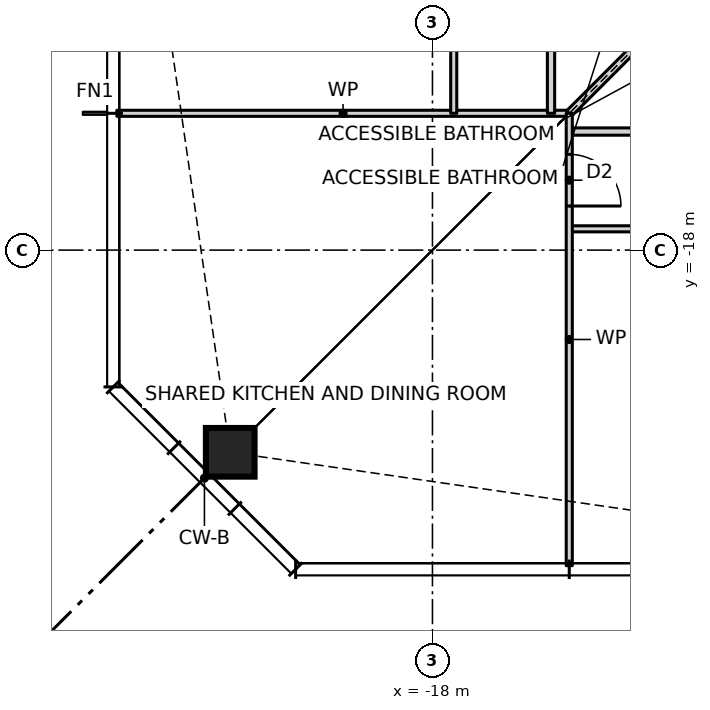
"""IFC4 building model, lengths in metres.
Left out: names, types, materials, properties, quantities, classifications, styles, units other than length and angle.
Written with IfcOpenShell. Run it as: python <this file> out.ifc"""

import sys

from ifc_helpers import new_model, si_unit, direction, frame, frame_2d, origin, origin_2d, place, context, subcontext, project, spatial, rectangle, hollow_rectangle, extrude, element, fill, save


model = new_model("IFC4")
c1 = context("Model", 3, precision=1e-05, world=origin(), true_north=direction((0.0, 1.0)))
c2 = subcontext(c1, "Body", "Model", "MODEL_VIEW")
j1 = project(units=[si_unit("LENGTHUNIT", "METRE"), si_unit("PLANEANGLEUNIT", "RADIAN")], contexts=[c1])
p1 = place(None, origin())
s1 = spatial("IfcSite", under=j1, at=p1, CompositionType="ELEMENT")
p2 = place(p1, origin())
s2 = spatial("IfcBuilding", under=s1, at=p2, CompositionType="ELEMENT")
p3 = place(p2, frame((0.0, 0.0, 18.5)))
s3 = spatial("IfcBuildingStorey", under=s2, at=p3, CompositionType="ELEMENT", Elevation=18.5)
p4 = place(p3, frame((-21.326, -21.326, 0.0), z_axis=(0.0, 0.0, 1.0), x_axis=(1.0, 0.0, 0.0)))
e1 = element("IfcColumn", 1, at=p4, inside=s3, PredefinedType="COLUMN", context=c2, shape_type="SweptSolid", body=[
    extrude(hollow_rectangle(XDim=0.8, YDim=0.8, WallThickness=0.09, at=origin_2d()), origin(), (0.0, 0.0, 1.0), 3.5),
])
p5 = place(p3, frame((-15.75, -17.65, 0.0), z_axis=(0.0, 0.0, 1.0), x_axis=(1.0, 0.0, 0.0)))
e2 = element("IfcWall", 2, at=p5, inside=s3, PredefinedType="PARTITIONING", context=c2, shape_type="SweptSolid", body=[
    extrude(rectangle(XDim=31.5, YDim=0.1, at=frame_2d((15.75, 0.0))), origin(), (0.0, 0.0, 1.0), 3.27),
])
p6 = place(p5, frame((1.8, 0.0, 0.0)))
e3 = element("IfcOpeningElement", 3, at=p6, cuts=e2, PredefinedType="OPENING", context=c2, shape_type="SweptSolid", body=[
    extrude(rectangle(XDim=0.9, YDim=2.1, at=frame_2d((0.45, 1.05))), frame((0.0, 0.06, 0.0), z_axis=(0.0, -1.0, 0.0), x_axis=(1.0, 0.0, 0.0)), (0.0, 0.0, 1.0), 0.12),
])
p7 = place(p5, frame((6.3, 0.0, 0.0)))
e4 = element("IfcOpeningElement", 4, at=p7, cuts=e2, PredefinedType="OPENING", context=c2, shape_type="SweptSolid", body=[
    extrude(rectangle(XDim=0.9, YDim=2.1, at=frame_2d((0.45, 1.05))), frame((0.0, 0.06, 0.0), z_axis=(0.0, -1.0, 0.0), x_axis=(1.0, 0.0, 0.0)), (0.0, 0.0, 1.0), 0.12),
])
p8 = place(p5, frame((10.8, 0.0, 0.0)))
e5 = element("IfcOpeningElement", 5, at=p8, cuts=e2, PredefinedType="OPENING", context=c2, shape_type="SweptSolid", body=[
    extrude(rectangle(XDim=0.9, YDim=2.1, at=frame_2d((0.45, 1.05))), frame((0.0, 0.06, 0.0), z_axis=(0.0, -1.0, 0.0), x_axis=(1.0, 0.0, 0.0)), (0.0, 0.0, 1.0), 0.12),
])
p9 = place(p5, frame((15.3, 0.0, 0.0)))
e6 = element("IfcOpeningElement", 6, at=p9, cuts=e2, PredefinedType="OPENING", context=c2, shape_type="SweptSolid", body=[
    extrude(rectangle(XDim=0.9, YDim=2.1, at=frame_2d((0.45, 1.05))), frame((0.0, 0.06, 0.0), z_axis=(0.0, -1.0, 0.0), x_axis=(1.0, 0.0, 0.0)), (0.0, 0.0, 1.0), 0.12),
])
p10 = place(p5, frame((19.8, 0.0, 0.0)))
e7 = element("IfcOpeningElement", 7, at=p10, cuts=e2, PredefinedType="OPENING", context=c2, shape_type="SweptSolid", body=[
    extrude(rectangle(XDim=0.9, YDim=2.1, at=frame_2d((0.45, 1.05))), frame((0.0, 0.06, 0.0), z_axis=(0.0, -1.0, 0.0), x_axis=(1.0, 0.0, 0.0)), (0.0, 0.0, 1.0), 0.12),
])
p11 = place(p5, frame((24.3, 0.0, 0.0)))
e8 = element("IfcOpeningElement", 8, at=p11, cuts=e2, PredefinedType="OPENING", context=c2, shape_type="SweptSolid", body=[
    extrude(rectangle(XDim=0.9, YDim=2.1, at=frame_2d((0.45, 1.05))), frame((0.0, 0.06, 0.0), z_axis=(0.0, -1.0, 0.0), x_axis=(1.0, 0.0, 0.0)), (0.0, 0.0, 1.0), 0.12),
])
p12 = place(p5, frame((28.8, 0.0, 0.0)))
e9 = element("IfcOpeningElement", 9, at=p12, cuts=e2, PredefinedType="OPENING", context=c2, shape_type="SweptSolid", body=[
    extrude(rectangle(XDim=0.9, YDim=2.1, at=frame_2d((0.45, 1.05))), frame((0.0, 0.06, 0.0), z_axis=(0.0, -1.0, 0.0), x_axis=(1.0, 0.0, 0.0)), (0.0, 0.0, 1.0), 0.12),
])
p13 = place(p3, frame((-15.75, -16.05, 0.0), z_axis=(0.0, 0.0, 1.0), x_axis=(1.0, 0.0, 0.0)))
e10 = element("IfcWall", 10, at=p13, inside=s3, PredefinedType="PARTITIONING", context=c2, shape_type="SweptSolid", body=[
    extrude(rectangle(XDim=5.6, YDim=0.12, at=frame_2d((2.8, 0.0))), origin(), (0.0, 0.0, 1.0), 3.27),
])
p14 = place(p13, frame((1.525, 0.0, 0.0)))
e11 = element("IfcOpeningElement", 11, at=p14, cuts=e10, PredefinedType="OPENING", context=c2, shape_type="SweptSolid", body=[
    extrude(rectangle(XDim=0.85, YDim=2.1, at=frame_2d((0.425, 1.05))), frame((0.0, 0.07, 0.0), z_axis=(0.0, -1.0, 0.0), x_axis=(1.0, 0.0, 0.0)), (0.0, 0.0, 1.0), 0.14),
])
p15 = place(p3, frame((-23.19, -15.75, 0.0), z_axis=(0.0, 0.0, 1.0), x_axis=(1.0, 0.0, 0.0)))
e12 = element("IfcWall", 12, at=p15, inside=s3, PredefinedType="PARTITIONING", context=c2, shape_type="SweptSolid", body=[
    extrude(rectangle(XDim=7.44, YDim=0.1, at=frame_2d((3.72, 0.0))), origin(), (0.0, 0.0, 1.0), 3.27),
])
p16 = place(p3, frame((-15.75, -15.75, 0.0), z_axis=(0.0, 0.0, 1.0), x_axis=(0.707106781187, 0.707106781187, 0.0)))
e13 = element("IfcWall", 13, at=p16, inside=s3, PredefinedType="PARTITIONING", context=c2, shape_type="SweptSolid", body=[
    extrude(rectangle(XDim=5.869, YDim=0.12, at=frame_2d((2.935, 0.0))), origin(), (0.0, 0.0, 1.0), 2.343),
])
p17 = place(p3, frame((-15.75, -23.19, 0.0), z_axis=(0.0, 0.0, 1.0), x_axis=(0.0, 1.0, 0.0)))
e14 = element("IfcWall", 14, at=p17, inside=s3, PredefinedType="PARTITIONING", context=c2, shape_type="SweptSolid", body=[
    extrude(rectangle(XDim=7.44, YDim=0.1, at=frame_2d((3.72, 0.0))), origin(), (0.0, 0.0, 1.0), 3.27),
])
p18 = place(p17, frame((5.915, 0.0, 0.0)))
e15 = element("IfcOpeningElement", 15, at=p18, cuts=e14, PredefinedType="OPENING", context=c2, shape_type="SweptSolid", body=[
    extrude(rectangle(XDim=0.85, YDim=2.1, at=frame_2d((0.425, 1.05))), frame((0.0, 0.06, 0.0), z_axis=(0.0, -1.0, 0.0), x_axis=(1.0, 0.0, 0.0)), (0.0, 0.0, 1.0), 0.12),
])
p19 = place(p3, frame((-16.05, -15.75, 0.0), z_axis=(0.0, 0.0, 1.0), x_axis=(0.0, 1.0, 0.0)))
e16 = element("IfcWall", 16, at=p19, inside=s3, PredefinedType="PARTITIONING", context=c2, shape_type="SweptSolid", body=[
    extrude(rectangle(XDim=5.1, YDim=0.12, at=frame_2d((2.55, 0.0))), origin(), (0.0, 0.0, 1.0), 3.27),
])
p20 = place(p19, frame((1.375, 0.0, 0.0)))
e17 = element("IfcOpeningElement", 17, at=p20, cuts=e16, PredefinedType="OPENING", context=c2, shape_type="SweptSolid", body=[
    extrude(rectangle(XDim=0.85, YDim=2.1, at=frame_2d((0.425, 1.05))), frame((0.0, 0.07, 0.0), z_axis=(0.0, -1.0, 0.0), x_axis=(1.0, 0.0, 0.0)), (0.0, 0.0, 1.0), 0.14),
])
p21 = place(p3, frame((-17.65, -15.75, 0.0), z_axis=(0.0, 0.0, 1.0), x_axis=(0.0, 1.0, 0.0)))
e18 = element("IfcWall", 18, at=p21, inside=s3, PredefinedType="PARTITIONING", context=c2, shape_type="SweptSolid", body=[
    extrude(rectangle(XDim=31.5, YDim=0.1, at=frame_2d((15.75, 0.0))), origin(), (0.0, 0.0, 1.0), 3.27),
])
p22 = place(p21, frame((28.8, 0.0, 0.0)))
e19 = element("IfcOpeningElement", 19, at=p22, cuts=e18, PredefinedType="OPENING", context=c2, shape_type="SweptSolid", body=[
    extrude(rectangle(XDim=0.9, YDim=2.1, at=frame_2d((0.45, 1.05))), frame((0.0, 0.06, 0.0), z_axis=(0.0, -1.0, 0.0), x_axis=(1.0, 0.0, 0.0)), (0.0, 0.0, 1.0), 0.12),
])
p23 = place(p21, frame((24.3, 0.0, 0.0)))
e20 = element("IfcOpeningElement", 20, at=p23, cuts=e18, PredefinedType="OPENING", context=c2, shape_type="SweptSolid", body=[
    extrude(rectangle(XDim=0.9, YDim=2.1, at=frame_2d((0.45, 1.05))), frame((0.0, 0.06, 0.0), z_axis=(0.0, -1.0, 0.0), x_axis=(1.0, 0.0, 0.0)), (0.0, 0.0, 1.0), 0.12),
])
p24 = place(p21, frame((19.8, 0.0, 0.0)))
e21 = element("IfcOpeningElement", 21, at=p24, cuts=e18, PredefinedType="OPENING", context=c2, shape_type="SweptSolid", body=[
    extrude(rectangle(XDim=0.9, YDim=2.1, at=frame_2d((0.45, 1.05))), frame((0.0, 0.06, 0.0), z_axis=(0.0, -1.0, 0.0), x_axis=(1.0, 0.0, 0.0)), (0.0, 0.0, 1.0), 0.12),
])
p25 = place(p21, frame((15.3, 0.0, 0.0)))
e22 = element("IfcOpeningElement", 22, at=p25, cuts=e18, PredefinedType="OPENING", context=c2, shape_type="SweptSolid", body=[
    extrude(rectangle(XDim=0.9, YDim=2.1, at=frame_2d((0.45, 1.05))), frame((0.0, 0.06, 0.0), z_axis=(0.0, -1.0, 0.0), x_axis=(1.0, 0.0, 0.0)), (0.0, 0.0, 1.0), 0.12),
])
p26 = place(p21, frame((10.8, 0.0, 0.0)))
e23 = element("IfcOpeningElement", 23, at=p26, cuts=e18, PredefinedType="OPENING", context=c2, shape_type="SweptSolid", body=[
    extrude(rectangle(XDim=0.9, YDim=2.1, at=frame_2d((0.45, 1.05))), frame((0.0, 0.06, 0.0), z_axis=(0.0, -1.0, 0.0), x_axis=(1.0, 0.0, 0.0)), (0.0, 0.0, 1.0), 0.12),
])
p27 = place(p21, frame((6.3, 0.0, 0.0)))
e24 = element("IfcOpeningElement", 24, at=p27, cuts=e18, PredefinedType="OPENING", context=c2, shape_type="SweptSolid", body=[
    extrude(rectangle(XDim=0.9, YDim=2.1, at=frame_2d((0.45, 1.05))), frame((0.0, 0.06, 0.0), z_axis=(0.0, -1.0, 0.0), x_axis=(1.0, 0.0, 0.0)), (0.0, 0.0, 1.0), 0.12),
])
p28 = place(p21, frame((1.8, 0.0, 0.0)))
e25 = element("IfcOpeningElement", 25, at=p28, cuts=e18, PredefinedType="OPENING", context=c2, shape_type="SweptSolid", body=[
    extrude(rectangle(XDim=0.9, YDim=2.1, at=frame_2d((0.45, 1.05))), frame((0.0, 0.06, 0.0), z_axis=(0.0, -1.0, 0.0), x_axis=(1.0, 0.0, 0.0)), (0.0, 0.0, 1.0), 0.12),
])
p29 = place(p18, frame((0.85, 0.0, 0.0), z_axis=(0.0, 0.0, 1.0), x_axis=(-1.0, 0.0, 0.0)))
e26 = element("IfcDoor", 26, at=p29, inside=s3, OperationType="SINGLE_SWING_RIGHT", PredefinedType="DOOR", context=c2, shape_type="SweptSolid", body=[
    extrude(rectangle(XDim=0.85, YDim=2.1, at=frame_2d((0.425, 1.05))), frame((0.0, 0.025, 0.0), z_axis=(0.0, -1.0, 0.0), x_axis=(1.0, 0.0, 0.0)), (0.0, 0.0, 1.0), 0.05),
])
fill(e15, e26)
save(model, sys.argv[1])
